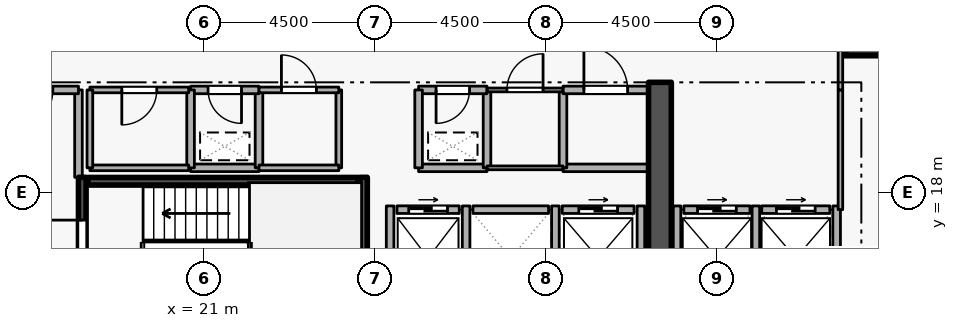
"""IFC4 building model, lengths in metres.
Left out: names, types, materials, properties, quantities, classifications, styles, units other than length and angle.
Written with IfcOpenShell. Run it as: python <this file> out.ifc"""

import sys

from ifc_helpers import new_model, si_unit, direction, frame, frame_2d, origin, origin_2d, place, context, subcontext, project, spatial, rectangle, extrude, element, fill, save


model = new_model("IFC4")
c1 = context("Model", 3, precision=1e-05, world=origin(), true_north=direction((0.0, 1.0)))
c2 = subcontext(c1, "Body", "Model", "MODEL_VIEW")
j1 = project(units=[si_unit("LENGTHUNIT", "METRE"), si_unit("PLANEANGLEUNIT", "RADIAN")], contexts=[c1])
p1 = place(None, origin())
s1 = spatial("IfcSite", under=j1, at=p1, CompositionType="ELEMENT")
p2 = place(p1, origin())
s2 = spatial("IfcBuilding", under=s1, at=p2, CompositionType="ELEMENT")
p3 = place(p2, frame((0.0, 0.0, 105.3)))
s3 = spatial("IfcBuildingStorey", under=s2, at=p3, CompositionType="ELEMENT", Elevation=105.3)
p4 = place(p3, frame((33.0, 15.2, 0.0), z_axis=(0.0, 0.0, 1.0), x_axis=(0.0, 1.0, 0.0)))
e1 = element("IfcWall", 1, at=p4, inside=s3, PredefinedType="SHEAR", context=c2, shape_type="SweptSolid", body=[
    extrude(rectangle(XDim=5.7, YDim=0.6, at=frame_2d((2.85, 0.0))), origin(), (0.0, 0.0, 1.0), 3.6),
])
p5 = place(p3, frame((38.5, 22.2, 0.0), z_axis=(0.0, 0.0, 1.0), x_axis=(1.0, 0.0, 0.0)))
e2 = element("IfcColumn", 2, at=p5, inside=s3, PredefinedType="COLUMN", context=c2, shape_type="SweptSolid", body=[
    extrude(rectangle(XDim=1.2, YDim=1.2, at=origin_2d()), origin(), (0.0, 0.0, 1.0), 3.6),
])
p6 = place(p3, frame((26.08, 17.55, 0.0), z_axis=(0.0, 0.0, 1.0), x_axis=(1.0, 0.0, 0.0)))
e3 = element("IfcWall", 3, at=p6, inside=s3, PredefinedType="STANDARD", context=c2, shape_type="SweptSolid", body=[
    extrude(rectangle(XDim=1.64, YDim=0.2, at=frame_2d((0.82, 0.0))), origin(), (0.0, 0.0, 1.0), 3.34),
])
p7 = place(p6, frame((0.31, 0.0, 0.0)))
e4 = element("IfcOpeningElement", 4, at=p7, cuts=e3, PredefinedType="OPENING", context=c2, shape_type="SweptSolid", body=[
    extrude(rectangle(XDim=1.02, YDim=2.06, at=frame_2d((0.51, 1.03))), frame((0.0, 0.11, 0.0), z_axis=(0.0, -1.0, 0.0), x_axis=(1.0, 0.0, 0.0)), (0.0, 0.0, 1.0), 0.22),
])
p8 = place(p3, frame((28.08, 17.55, 0.0), z_axis=(0.0, 0.0, 1.0), x_axis=(1.0, 0.0, 0.0)))
e5 = element("IfcWall", 5, at=p8, inside=s3, PredefinedType="STANDARD", context=c2, shape_type="SweptSolid", body=[
    extrude(rectangle(XDim=1.99, YDim=0.2, at=frame_2d((0.995, 0.0))), origin(), (0.0, 0.0, 1.0), 3.34),
])
p9 = place(p3, frame((30.43, 17.55, 0.0), z_axis=(0.0, 0.0, 1.0), x_axis=(1.0, 0.0, 0.0)))
e6 = element("IfcWall", 6, at=p9, inside=s3, PredefinedType="STANDARD", context=c2, shape_type="SweptSolid", body=[
    extrude(rectangle(XDim=1.89, YDim=0.2, at=frame_2d((0.945, 0.0))), origin(), (0.0, 0.0, 1.0), 3.34),
])
p10 = place(p9, frame((0.435, 0.0, 0.0)))
e7 = element("IfcOpeningElement", 7, at=p10, cuts=e6, PredefinedType="OPENING", context=c2, shape_type="SweptSolid", body=[
    extrude(rectangle(XDim=1.02, YDim=2.06, at=frame_2d((0.51, 1.03))), frame((0.0, 0.11, 0.0), z_axis=(0.0, -1.0, 0.0), x_axis=(1.0, 0.0, 0.0)), (0.0, 0.0, 1.0), 0.22),
])
p11 = place(p3, frame((33.63, 17.55, 0.0), z_axis=(0.0, 0.0, 1.0), x_axis=(1.0, 0.0, 0.0)))
e8 = element("IfcWall", 8, at=p11, inside=s3, PredefinedType="STANDARD", context=c2, shape_type="SweptSolid", body=[
    extrude(rectangle(XDim=1.74, YDim=0.2, at=frame_2d((0.87, 0.0))), origin(), (0.0, 0.0, 1.0), 3.34),
])
p12 = place(p11, frame((0.36, 0.0, 0.0)))
e9 = element("IfcOpeningElement", 9, at=p12, cuts=e8, PredefinedType="OPENING", context=c2, shape_type="SweptSolid", body=[
    extrude(rectangle(XDim=1.02, YDim=2.06, at=frame_2d((0.51, 1.03))), frame((0.0, 0.11, 0.0), z_axis=(0.0, -1.0, 0.0), x_axis=(1.0, 0.0, 0.0)), (0.0, 0.0, 1.0), 0.22),
])
p13 = place(p3, frame((35.68, 17.55, 0.0), z_axis=(0.0, 0.0, 1.0), x_axis=(1.0, 0.0, 0.0)))
e10 = element("IfcWall", 10, at=p13, inside=s3, PredefinedType="STANDARD", context=c2, shape_type="SweptSolid", body=[
    extrude(rectangle(XDim=1.79, YDim=0.2, at=frame_2d((0.895, 0.0))), origin(), (0.0, 0.0, 1.0), 3.34),
])
p14 = place(p13, frame((0.385, 0.0, 0.0)))
e11 = element("IfcOpeningElement", 11, at=p14, cuts=e10, PredefinedType="OPENING", context=c2, shape_type="SweptSolid", body=[
    extrude(rectangle(XDim=1.02, YDim=2.06, at=frame_2d((0.51, 1.03))), frame((0.0, 0.11, 0.0), z_axis=(0.0, -1.0, 0.0), x_axis=(1.0, 0.0, 0.0)), (0.0, 0.0, 1.0), 0.22),
])
for number, where, z_axis, x_axis in (
    (12, (27.9, 15.212, 0.0), (0.0, 0.0, 1.0), (0.0, 1.0, 0.0)),
    (13, (25.9, 15.212, 0.0), (0.0, 0.0, 1.0), (0.0, 1.0, 0.0)),
    (14, (30.25, 15.212, 0.0), (0.0, 0.0, 1.0), (0.0, 1.0, 0.0)),
    (15, (32.5, 15.212, 0.0), (0.0, 0.0, 1.0), (0.0, 1.0, 0.0)),
):
    element("IfcWall", number, at=place(p3, frame(where, z_axis=z_axis, x_axis=x_axis)), inside=s3, PredefinedType="STANDARD", context=c2, shape_type="SweptSolid", body=[
        extrude(rectangle(XDim=2.436, YDim=0.2, at=frame_2d((1.218, 0.0))), origin(), (0.0, 0.0, 1.0), 3.34),
    ])
for number, where, z_axis, x_axis in (
    (16, (35.525, 15.012, 0.0), (0.0, 0.0, 1.0), (0.0, 1.0, 0.0)),
    (17, (33.45, 15.012, 0.0), (0.0, 0.0, 1.0), (0.0, 1.0, 0.0)),
    (18, (37.65, 15.012, 0.0), (0.0, 0.0, 1.0), (0.0, 1.0, 0.0)),
):
    element("IfcWall", number, at=place(p3, frame(where, z_axis=z_axis, x_axis=x_axis)), inside=s3, PredefinedType="STANDARD", context=c2, shape_type="SweptSolid", body=[
        extrude(rectangle(XDim=2.636, YDim=0.2, at=frame_2d((1.318, 0.0))), origin(), (0.0, 0.0, 1.0), 3.34),
    ])
p15 = place(p3, frame((17.8, 15.05, 0.0), z_axis=(0.0, 0.0, 1.0), x_axis=(0.0, 1.0, 0.0)))
e19 = element("IfcWall", 19, at=p15, inside=s3, PredefinedType="SHEAR", context=c2, shape_type="SweptSolid", body=[
    extrude(rectangle(XDim=3.35, YDim=0.2, at=frame_2d((1.675, 0.0))), origin(), (0.0, 0.0, 1.0), 3.6),
])
p16 = place(p15, frame((1.125, 0.0, 0.0)))
e20 = element("IfcOpeningElement", 20, at=p16, cuts=e19, PredefinedType="OPENING", context=c2, shape_type="SweptSolid", body=[
    extrude(rectangle(XDim=1.1, YDim=2.1, at=frame_2d((0.55, 1.05))), frame((0.0, 0.11, 0.0), z_axis=(0.0, -1.0, 0.0), x_axis=(1.0, 0.0, 0.0)), (0.0, 0.0, 1.0), 0.22),
])
p17 = place(p3, frame((25.2, 18.4, 0.0), z_axis=(0.0, 0.0, 1.0), x_axis=(0.0, -1.0, 0.0)))
e21 = element("IfcWall", 21, at=p17, inside=s3, PredefinedType="SHEAR", context=c2, shape_type="SweptSolid", body=[
    extrude(rectangle(XDim=3.35, YDim=0.2, at=frame_2d((1.675, 0.0))), origin(), (0.0, 0.0, 1.0), 3.6),
])
p18 = place(p3, frame((25.05, 18.297, 0.0), z_axis=(0.0, 0.0, 1.0), x_axis=(-1.0, 0.0, 0.0)))
e22 = element("IfcWall", 22, at=p18, inside=s3, PredefinedType="SHEAR", context=c2, shape_type="SweptSolid", body=[
    extrude(rectangle(XDim=7.1, YDim=0.2, at=frame_2d((3.55, 0.0))), origin(), (0.0, 0.0, 1.0), 3.6),
])
p19 = place(p3, frame((17.7, 18.4, 0.0), z_axis=(0.0, 0.0, 1.0), x_axis=(0.0, 1.0, 0.0)))
e23 = element("IfcWall", 23, at=p19, inside=s3, PredefinedType="STANDARD", context=c2, shape_type="SweptSolid", body=[
    extrude(rectangle(XDim=2.3, YDim=0.2, at=frame_2d((1.15, 0.0))), origin(), (0.0, 0.0, 1.0), 2.545),
])
p20 = place(p3, frame((17.7, 20.7, 0.0), z_axis=(0.0, 0.0, 1.0), x_axis=(-1.0, 0.0, 0.0)))
e24 = element("IfcWall", 24, at=p20, inside=s3, PredefinedType="STANDARD", context=c2, shape_type="SweptSolid", body=[
    extrude(rectangle(XDim=2.5, YDim=0.2, at=frame_2d((1.25, 0.0))), origin(), (0.0, 0.0, 1.0), 3.34),
])
p21 = place(p20, frame((0.675, 0.0, 0.0)))
e25 = element("IfcOpeningElement", 25, at=p21, cuts=e24, PredefinedType="OPENING", context=c2, shape_type="SweptSolid", body=[
    extrude(rectangle(XDim=1.15, YDim=2.1, at=frame_2d((0.575, 1.05))), frame((0.0, 0.11, 0.0), z_axis=(0.0, -1.0, 0.0), x_axis=(1.0, 0.0, 0.0)), (0.0, 0.0, 1.0), 0.22),
])
p22 = place(p3, frame((26.65, 18.65, 0.0), z_axis=(0.0, 0.0, 1.0), x_axis=(1.0, 0.0, 0.0)))
e26 = element("IfcWall", 26, at=p22, inside=s3, PredefinedType="STANDARD", context=c2, shape_type="SweptSolid", body=[
    extrude(rectangle(XDim=1.8, YDim=0.2, at=frame_2d((0.9, 0.0))), origin(), (0.0, 0.0, 1.0), 3.34),
])
p23 = place(p3, frame((28.45, 18.65, 0.0), z_axis=(0.0, 0.0, 1.0), x_axis=(0.0, 1.0, 0.0)))
e27 = element("IfcWall", 27, at=p23, inside=s3, PredefinedType="STANDARD", context=c2, shape_type="SweptSolid", body=[
    extrude(rectangle(XDim=2.05, YDim=0.2, at=frame_2d((1.025, 0.0))), origin(), (0.0, 0.0, 1.0), 3.34),
])
p24 = place(p3, frame((28.45, 20.7, 0.0), z_axis=(0.0, 0.0, 1.0), x_axis=(-1.0, 0.0, 0.0)))
e28 = element("IfcWall", 28, at=p24, inside=s3, PredefinedType="STANDARD", context=c2, shape_type="SweptSolid", body=[
    extrude(rectangle(XDim=1.8, YDim=0.2, at=frame_2d((0.9, 0.0))), origin(), (0.0, 0.0, 1.0), 3.34),
])
p25 = place(p24, frame((0.46, 0.0, 0.0)))
e29 = element("IfcOpeningElement", 29, at=p25, cuts=e28, PredefinedType="OPENING", context=c2, shape_type="SweptSolid", body=[
    extrude(rectangle(XDim=0.88, YDim=2.04, at=frame_2d((0.44, 1.02))), frame((0.0, 0.11, 0.0), z_axis=(0.0, -1.0, 0.0), x_axis=(1.0, 0.0, 0.0)), (0.0, 0.0, 1.0), 0.22),
])
p26 = place(p3, frame((26.65, 20.7, 0.0), z_axis=(0.0, 0.0, 1.0), x_axis=(0.0, -1.0, 0.0)))
e30 = element("IfcWall", 30, at=p26, inside=s3, PredefinedType="STANDARD", context=c2, shape_type="SweptSolid", body=[
    extrude(rectangle(XDim=2.05, YDim=0.2, at=frame_2d((1.025, 0.0))), origin(), (0.0, 0.0, 1.0), 3.34),
])
p27 = place(p3, frame((20.65, 18.65, 0.0), z_axis=(0.0, 0.0, 1.0), x_axis=(1.0, 0.0, 0.0)))
e31 = element("IfcWall", 31, at=p27, inside=s3, PredefinedType="STANDARD", context=c2, shape_type="SweptSolid", body=[
    extrude(rectangle(XDim=1.8, YDim=0.2, at=frame_2d((0.9, 0.0))), origin(), (0.0, 0.0, 1.0), 3.34),
])
p28 = place(p3, frame((22.45, 18.65, 0.0), z_axis=(0.0, 0.0, 1.0), x_axis=(0.0, 1.0, 0.0)))
e32 = element("IfcWall", 32, at=p28, inside=s3, PredefinedType="STANDARD", context=c2, shape_type="SweptSolid", body=[
    extrude(rectangle(XDim=2.05, YDim=0.2, at=frame_2d((1.025, 0.0))), origin(), (0.0, 0.0, 1.0), 3.34),
])
p29 = place(p3, frame((22.45, 20.7, 0.0), z_axis=(0.0, 0.0, 1.0), x_axis=(-1.0, 0.0, 0.0)))
e33 = element("IfcWall", 33, at=p29, inside=s3, PredefinedType="STANDARD", context=c2, shape_type="SweptSolid", body=[
    extrude(rectangle(XDim=1.8, YDim=0.2, at=frame_2d((0.9, 0.0))), origin(), (0.0, 0.0, 1.0), 3.34),
])
p30 = place(p29, frame((0.46, 0.0, 0.0)))
e34 = element("IfcOpeningElement", 34, at=p30, cuts=e33, PredefinedType="OPENING", context=c2, shape_type="SweptSolid", body=[
    extrude(rectangle(XDim=0.88, YDim=2.04, at=frame_2d((0.44, 1.02))), frame((0.0, 0.11, 0.0), z_axis=(0.0, -1.0, 0.0), x_axis=(1.0, 0.0, 0.0)), (0.0, 0.0, 1.0), 0.22),
])
p31 = place(p3, frame((20.65, 20.7, 0.0), z_axis=(0.0, 0.0, 1.0), x_axis=(0.0, -1.0, 0.0)))
e35 = element("IfcWall", 35, at=p31, inside=s3, PredefinedType="STANDARD", context=c2, shape_type="SweptSolid", body=[
    extrude(rectangle(XDim=2.05, YDim=0.2, at=frame_2d((1.025, 0.0))), origin(), (0.0, 0.0, 1.0), 3.34),
])
p32 = place(p3, frame((32.7, 18.65, 0.0), z_axis=(0.0, 0.0, 1.0), x_axis=(-1.0, 0.0, 0.0)))
e36 = element("IfcWall", 36, at=p32, inside=s3, PredefinedType="STANDARD", context=c2, shape_type="SweptSolid", body=[
    extrude(rectangle(XDim=2.25, YDim=0.2, at=frame_2d((1.125, 0.0))), origin(), (0.0, 0.0, 1.0), 3.34),
])
p33 = place(p3, frame((30.45, 18.65, 0.0), z_axis=(0.0, 0.0, 1.0), x_axis=(0.0, 1.0, 0.0)))
e37 = element("IfcWall", 37, at=p33, inside=s3, PredefinedType="STANDARD", context=c2, shape_type="SweptSolid", body=[
    extrude(rectangle(XDim=2.05, YDim=0.2, at=frame_2d((1.025, 0.0))), origin(), (0.0, 0.0, 1.0), 3.34),
])
p34 = place(p3, frame((30.45, 20.7, 0.0), z_axis=(0.0, 0.0, 1.0), x_axis=(1.0, 0.0, 0.0)))
e38 = element("IfcWall", 38, at=p34, inside=s3, PredefinedType="STANDARD", context=c2, shape_type="SweptSolid", body=[
    extrude(rectangle(XDim=2.25, YDim=0.2, at=frame_2d((1.125, 0.0))), origin(), (0.0, 0.0, 1.0), 3.34),
])
p35 = place(p34, frame((0.55, 0.0, 0.0)))
e39 = element("IfcOpeningElement", 39, at=p35, cuts=e38, PredefinedType="OPENING", context=c2, shape_type="SweptSolid", body=[
    extrude(rectangle(XDim=1.15, YDim=2.1, at=frame_2d((0.575, 1.05))), frame((0.0, 0.11, 0.0), z_axis=(0.0, -1.0, 0.0), x_axis=(1.0, 0.0, 0.0)), (0.0, 0.0, 1.0), 0.22),
])
p36 = place(p3, frame((18.0, 18.65, 0.0), z_axis=(0.0, 0.0, 1.0), x_axis=(1.0, 0.0, 0.0)))
e40 = element("IfcWall", 40, at=p36, inside=s3, PredefinedType="PARTITIONING", context=c2, shape_type="SweptSolid", body=[
    extrude(rectangle(XDim=2.6, YDim=0.15, at=frame_2d((1.3, 0.0))), origin(), (0.0, 0.0, 1.0), 3.34),
])
p37 = place(p3, frame((20.6, 20.7, 0.0), z_axis=(0.0, 0.0, 1.0), x_axis=(-1.0, 0.0, 0.0)))
e41 = element("IfcWall", 41, at=p37, inside=s3, PredefinedType="PARTITIONING", context=c2, shape_type="SweptSolid", body=[
    extrude(rectangle(XDim=2.6, YDim=0.15, at=frame_2d((1.3, 0.0))), origin(), (0.0, 0.0, 1.0), 3.34),
])
p38 = place(p37, frame((0.84, 0.0, 0.0)))
e42 = element("IfcOpeningElement", 42, at=p38, cuts=e41, PredefinedType="OPENING", context=c2, shape_type="SweptSolid", body=[
    extrude(rectangle(XDim=0.92, YDim=2.08, at=frame_2d((0.46, 1.04))), frame((0.0, 0.085, 0.0), z_axis=(0.0, -1.0, 0.0), x_axis=(1.0, 0.0, 0.0)), (0.0, 0.0, 1.0), 0.17),
])
p39 = place(p3, frame((18.0, 20.7, 0.0), z_axis=(0.0, 0.0, 1.0), x_axis=(0.0, -1.0, 0.0)))
e43 = element("IfcWall", 43, at=p39, inside=s3, PredefinedType="PARTITIONING", context=c2, shape_type="SweptSolid", body=[
    extrude(rectangle(XDim=2.05, YDim=0.15, at=frame_2d((1.025, 0.0))), origin(), (0.0, 0.0, 1.0), 2.545),
])
p40 = place(p3, frame((24.55, 20.7, 0.0), z_axis=(0.0, 0.0, 1.0), x_axis=(0.0, -1.0, 0.0)))
e44 = element("IfcWall", 44, at=p40, inside=s3, PredefinedType="PARTITIONING", context=c2, shape_type="SweptSolid", body=[
    extrude(rectangle(XDim=2.05, YDim=0.15, at=frame_2d((1.025, 0.0))), origin(), (0.0, 0.0, 1.0), 3.34),
])
p41 = place(p3, frame((24.55, 18.65, 0.0), z_axis=(0.0, 0.0, 1.0), x_axis=(-1.0, 0.0, 0.0)))
e45 = element("IfcWall", 45, at=p41, inside=s3, PredefinedType="PARTITIONING", context=c2, shape_type="SweptSolid", body=[
    extrude(rectangle(XDim=2.1, YDim=0.15, at=frame_2d((1.05, 0.0))), origin(), (0.0, 0.0, 1.0), 3.34),
])
p42 = place(p3, frame((22.45, 20.7, 0.0), z_axis=(0.0, 0.0, 1.0), x_axis=(1.0, 0.0, 0.0)))
e46 = element("IfcWall", 46, at=p42, inside=s3, PredefinedType="PARTITIONING", context=c2, shape_type="SweptSolid", body=[
    extrude(rectangle(XDim=2.1, YDim=0.15, at=frame_2d((1.05, 0.0))), origin(), (0.0, 0.0, 1.0), 3.34),
])
p43 = place(p42, frame((0.59, 0.0, 0.0)))
e47 = element("IfcOpeningElement", 47, at=p43, cuts=e46, PredefinedType="OPENING", context=c2, shape_type="SweptSolid", body=[
    extrude(rectangle(XDim=0.92, YDim=2.08, at=frame_2d((0.46, 1.04))), frame((0.0, 0.085, 0.0), z_axis=(0.0, -1.0, 0.0), x_axis=(1.0, 0.0, 0.0)), (0.0, 0.0, 1.0), 0.17),
])
p44 = place(p3, frame((30.45, 18.65, 0.0), z_axis=(0.0, 0.0, 1.0), x_axis=(-1.0, 0.0, 0.0)))
e48 = element("IfcWall", 48, at=p44, inside=s3, PredefinedType="PARTITIONING", context=c2, shape_type="SweptSolid", body=[
    extrude(rectangle(XDim=2.0, YDim=0.1, at=frame_2d((1.0, 0.0))), origin(), (0.0, 0.0, 1.0), 3.34),
])
p45 = place(p3, frame((28.45, 20.7, 0.0), z_axis=(0.0, 0.0, 1.0), x_axis=(1.0, 0.0, 0.0)))
e49 = element("IfcWall", 49, at=p45, inside=s3, PredefinedType="PARTITIONING", context=c2, shape_type="SweptSolid", body=[
    extrude(rectangle(XDim=2.0, YDim=0.1, at=frame_2d((1.0, 0.0))), origin(), (0.0, 0.0, 1.0), 3.34),
])
p46 = place(p45, frame((0.525, 0.0, 0.0)))
e50 = element("IfcOpeningElement", 50, at=p46, cuts=e49, PredefinedType="OPENING", context=c2, shape_type="SweptSolid", body=[
    extrude(rectangle(XDim=0.95, YDim=2.1, at=frame_2d((0.475, 1.05))), frame((0.0, 0.06, 0.0), z_axis=(0.0, -1.0, 0.0), x_axis=(1.0, 0.0, 0.0)), (0.0, 0.0, 1.0), 0.12),
])
p47 = place(p3, frame((37.75, 17.55, 0.0), z_axis=(0.0, 0.0, 1.0), x_axis=(0.0, 1.0, 0.0)))
e51 = element("IfcWall", 51, at=p47, inside=s3, PredefinedType="PARTITIONING", context=c2, shape_type="SweptSolid", body=[
    extrude(rectangle(XDim=3.15, YDim=0.12, at=frame_2d((1.575, 0.0))), origin(), (0.0, 0.0, 1.0), 3.34),
])
p48 = place(p3, frame((37.75, 20.7, 0.0), z_axis=(0.0, 0.0, 1.0), x_axis=(0.0, 1.0, 0.0)))
e52 = element("IfcWall", 52, at=p48, inside=s3, PredefinedType="PARTITIONING", context=c2, shape_type="SweptSolid", body=[
    extrude(rectangle(XDim=1.85, YDim=0.12, at=frame_2d((0.925, 0.0))), origin(), (0.0, 0.0, 1.0), 3.34),
])
p49 = place(p7, origin())
e53 = element("IfcDoor", 53, at=p49, inside=s3, OperationType="SLIDING_TO_LEFT", PredefinedType="DOOR", context=c2, shape_type="SweptSolid", body=[
    extrude(rectangle(XDim=1.02, YDim=2.06, at=frame_2d((0.51, 1.03))), frame((0.0, 0.025, 0.0), z_axis=(0.0, -1.0, 0.0), x_axis=(1.0, 0.0, 0.0)), (0.0, 0.0, 1.0), 0.05),
])
fill(e4, e53)
p50 = place(p10, origin())
e54 = element("IfcDoor", 54, at=p50, inside=s3, OperationType="SLIDING_TO_LEFT", PredefinedType="DOOR", context=c2, shape_type="SweptSolid", body=[
    extrude(rectangle(XDim=1.02, YDim=2.06, at=frame_2d((0.51, 1.03))), frame((0.0, 0.025, 0.0), z_axis=(0.0, -1.0, 0.0), x_axis=(1.0, 0.0, 0.0)), (0.0, 0.0, 1.0), 0.05),
])
fill(e7, e54)
p51 = place(p12, origin())
e55 = element("IfcDoor", 55, at=p51, inside=s3, OperationType="SLIDING_TO_LEFT", PredefinedType="DOOR", context=c2, shape_type="SweptSolid", body=[
    extrude(rectangle(XDim=1.02, YDim=2.06, at=frame_2d((0.51, 1.03))), frame((0.0, 0.025, 0.0), z_axis=(0.0, -1.0, 0.0), x_axis=(1.0, 0.0, 0.0)), (0.0, 0.0, 1.0), 0.05),
])
fill(e9, e55)
p52 = place(p14, origin())
e56 = element("IfcDoor", 56, at=p52, inside=s3, OperationType="SLIDING_TO_LEFT", PredefinedType="DOOR", context=c2, shape_type="SweptSolid", body=[
    extrude(rectangle(XDim=1.02, YDim=2.06, at=frame_2d((0.51, 1.03))), frame((0.0, 0.025, 0.0), z_axis=(0.0, -1.0, 0.0), x_axis=(1.0, 0.0, 0.0)), (0.0, 0.0, 1.0), 0.05),
])
fill(e11, e56)
p53 = place(p16, origin())
e57 = element("IfcDoor", 57, at=p53, inside=s3, OperationType="SINGLE_SWING_RIGHT", PredefinedType="DOOR", context=c2, shape_type="SweptSolid", body=[
    extrude(rectangle(XDim=1.1, YDim=2.1, at=frame_2d((0.55, 1.05))), frame((0.0, 0.025, 0.0), z_axis=(0.0, -1.0, 0.0), x_axis=(1.0, 0.0, 0.0)), (0.0, 0.0, 1.0), 0.05),
])
fill(e20, e57)
p54 = place(p21, origin())
e58 = element("IfcDoor", 58, at=p54, inside=s3, OperationType="SINGLE_SWING_RIGHT", PredefinedType="DOOR", context=c2, shape_type="SweptSolid", body=[
    extrude(rectangle(XDim=1.15, YDim=2.1, at=frame_2d((0.575, 1.05))), frame((0.0, 0.025, 0.0), z_axis=(0.0, -1.0, 0.0), x_axis=(1.0, 0.0, 0.0)), (0.0, 0.0, 1.0), 0.05),
])
fill(e25, e58)
p55 = place(p25, origin())
e59 = element("IfcDoor", 59, at=p55, inside=s3, OperationType="SINGLE_SWING_RIGHT", PredefinedType="DOOR", context=c2, shape_type="SweptSolid", body=[
    extrude(rectangle(XDim=0.88, YDim=2.04, at=frame_2d((0.44, 1.02))), frame((0.0, 0.025, 0.0), z_axis=(0.0, -1.0, 0.0), x_axis=(1.0, 0.0, 0.0)), (0.0, 0.0, 1.0), 0.05),
])
fill(e29, e59)
p56 = place(p30, origin())
e60 = element("IfcDoor", 60, at=p56, inside=s3, OperationType="SINGLE_SWING_LEFT", PredefinedType="DOOR", context=c2, shape_type="SweptSolid", body=[
    extrude(rectangle(XDim=0.88, YDim=2.04, at=frame_2d((0.44, 1.02))), frame((0.0, 0.025, 0.0), z_axis=(0.0, -1.0, 0.0), x_axis=(1.0, 0.0, 0.0)), (0.0, 0.0, 1.0), 0.05),
])
fill(e34, e60)
p57 = place(p38, origin())
e61 = element("IfcDoor", 61, at=p57, inside=s3, OperationType="SINGLE_SWING_RIGHT", PredefinedType="DOOR", context=c2, shape_type="SweptSolid", body=[
    extrude(rectangle(XDim=0.92, YDim=2.08, at=frame_2d((0.46, 1.04))), frame((0.0, 0.025, 0.0), z_axis=(0.0, -1.0, 0.0), x_axis=(1.0, 0.0, 0.0)), (0.0, 0.0, 1.0), 0.05),
])
fill(e42, e61)
p58 = place(p43, origin())
e62 = element("IfcDoor", 62, at=p58, inside=s3, OperationType="SINGLE_SWING_LEFT", PredefinedType="DOOR", context=c2, shape_type="SweptSolid", body=[
    extrude(rectangle(XDim=0.92, YDim=2.08, at=frame_2d((0.46, 1.04))), frame((0.0, 0.025, 0.0), z_axis=(0.0, -1.0, 0.0), x_axis=(1.0, 0.0, 0.0)), (0.0, 0.0, 1.0), 0.05),
])
fill(e47, e62)
p59 = place(p46, origin())
e63 = element("IfcDoor", 63, at=p59, inside=s3, OperationType="SINGLE_SWING_RIGHT", PredefinedType="DOOR", context=c2, shape_type="SweptSolid", body=[
    extrude(rectangle(XDim=0.95, YDim=2.1, at=frame_2d((0.475, 1.05))), frame((0.0, 0.025, 0.0), z_axis=(0.0, -1.0, 0.0), x_axis=(1.0, 0.0, 0.0)), (0.0, 0.0, 1.0), 0.05),
])
fill(e50, e63)
p60 = place(p35, origin())
e64 = element("IfcDoor", 64, at=p60, inside=s3, OperationType="SINGLE_SWING_LEFT", PredefinedType="DOOR", context=c2, shape_type="SweptSolid", body=[
    extrude(rectangle(XDim=1.15, YDim=2.1, at=frame_2d((0.575, 1.05))), frame((0.0, 0.025, 0.0), z_axis=(0.0, -1.0, 0.0), x_axis=(1.0, 0.0, 0.0)), (0.0, 0.0, 1.0), 0.05),
])
fill(e39, e64)
save(model, sys.argv[1])
